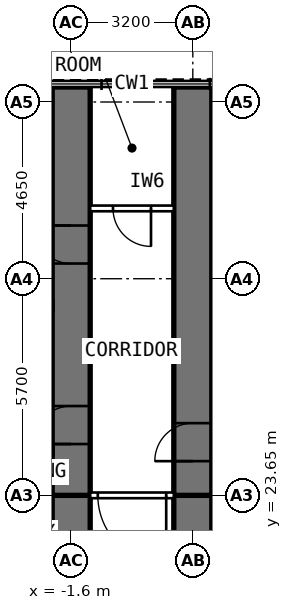
"""IFC4 building model, lengths in metres.
Left out: names, types, materials, properties, quantities, classifications, styles, units other than length and angle.
Written with IfcOpenShell. Run it as: python <this file> out.ifc"""

import sys

from ifc_helpers import new_model, si_unit, direction, frame, frame_2d, origin, place, context, subcontext, project, spatial, rectangle, extrude, element, fill, save


model = new_model("IFC4")
c1 = context("Model", 3, precision=1e-05, world=origin(), true_north=direction((0.0, 1.0)))
c2 = subcontext(c1, "Body", "Model", "MODEL_VIEW")
j1 = project(units=[si_unit("LENGTHUNIT", "METRE"), si_unit("PLANEANGLEUNIT", "RADIAN")], contexts=[c1])
p1 = place(None, origin())
s1 = spatial("IfcSite", under=j1, at=p1, CompositionType="ELEMENT")
p2 = place(p1, origin())
s2 = spatial("IfcBuilding", under=s1, at=p2, CompositionType="ELEMENT")
p3 = place(p2, frame((0.0, 0.0, 43.0)))
s3 = spatial("IfcBuildingStorey", under=s2, at=p3, CompositionType="ELEMENT", Elevation=43.0)
p4 = place(p3, frame((-1.6, 17.95, 0.0), z_axis=(0.0, 0.0, 1.0), x_axis=(0.0, 1.0, 0.0)))
e1 = element("IfcWall", 1, at=p4, inside=s3, PredefinedType="SHEAR", context=c2, shape_type="SweptSolid", body=[
    extrude(rectangle(XDim=5.7, YDim=1.0, at=frame_2d((2.85, 0.0))), origin(), (0.0, 0.0, 1.0), 3.6),
])
p5 = place(p3, frame((-1.6, 23.65, 0.0), z_axis=(0.0, 0.0, 1.0), x_axis=(0.0, 1.0, 0.0)))
e2 = element("IfcWall", 2, at=p5, inside=s3, PredefinedType="SHEAR", context=c2, shape_type="SweptSolid", body=[
    extrude(rectangle(XDim=10.745, YDim=1.0, at=frame_2d((5.373, 0.0))), origin(), (0.0, 0.0, 1.0), 3.6),
])
p6 = place(p5, frame((6.1, 0.0, 0.0)))
e3 = element("IfcOpeningElement", 3, at=p6, cuts=e2, PredefinedType="OPENING", context=c2, shape_type="SweptSolid", body=[
    extrude(rectangle(XDim=1.0, YDim=2.1, at=frame_2d((0.5, 1.05))), frame((0.0, 0.512, 0.0), z_axis=(0.0, -1.0, 0.0), x_axis=(1.0, 0.0, 0.0)), (0.0, 0.0, 1.0), 1.024),
])
p7 = place(p5, frame((1.35, 0.0, 0.0)))
e4 = element("IfcOpeningElement", 4, at=p7, cuts=e2, PredefinedType="OPENING", context=c2, shape_type="SweptSolid", body=[
    extrude(rectangle(XDim=1.0, YDim=2.1, at=frame_2d((0.5, 1.05))), frame((0.0, 0.512, 0.0), z_axis=(0.0, -1.0, 0.0), x_axis=(1.0, 0.0, 0.0)), (0.0, 0.0, 1.0), 1.024),
])
p8 = place(p3, frame((1.6, 17.95, 0.0), z_axis=(0.0, 0.0, 1.0), x_axis=(0.0, 1.0, 0.0)))
e5 = element("IfcWall", 5, at=p8, inside=s3, PredefinedType="SHEAR", context=c2, shape_type="SweptSolid", body=[
    extrude(rectangle(XDim=5.7, YDim=1.0, at=frame_2d((2.85, 0.0))), origin(), (0.0, 0.0, 1.0), 3.6),
])
p9 = place(p3, frame((1.6, 23.65, 0.0), z_axis=(0.0, 0.0, 1.0), x_axis=(0.0, 1.0, 0.0)))
e6 = element("IfcWall", 6, at=p9, inside=s3, PredefinedType="SHEAR", context=c2, shape_type="SweptSolid", body=[
    extrude(rectangle(XDim=10.745, YDim=1.0, at=frame_2d((5.373, 0.0))), origin(), (0.0, 0.0, 1.0), 3.6),
])
p10 = place(p9, frame((0.9, 0.0, 0.0)))
e7 = element("IfcOpeningElement", 7, at=p10, cuts=e6, PredefinedType="OPENING", context=c2, shape_type="SweptSolid", body=[
    extrude(rectangle(XDim=1.0, YDim=2.1, at=frame_2d((0.5, 1.05))), frame((0.0, 0.512, 0.0), z_axis=(0.0, -1.0, 0.0), x_axis=(1.0, 0.0, 0.0)), (0.0, 0.0, 1.0), 1.024),
])
p11 = place(p3, frame((-2.1, 31.45, 0.0), z_axis=(0.0, 0.0, 1.0), x_axis=(-1.0, 0.0, 0.0)))
e8 = element("IfcWall", 8, at=p11, inside=s3, PredefinedType="PARTITIONING", context=c2, shape_type="SweptSolid", body=[
    extrude(rectangle(XDim=3.39, YDim=0.12, at=frame_2d((1.695, 0.0))), origin(), (0.0, 0.0, 1.0), 3.35),
])
p12 = place(p11, frame((1.295, 0.0, 0.0)))
e9 = element("IfcOpeningElement", 9, at=p12, cuts=e8, PredefinedType="OPENING", context=c2, shape_type="SweptSolid", body=[
    extrude(rectangle(XDim=0.8, YDim=2.1, at=frame_2d((0.4, 1.05))), frame((0.0, 0.072, 0.0), z_axis=(0.0, -1.0, 0.0), x_axis=(1.0, 0.0, 0.0)), (0.0, 0.0, 1.0), 0.144),
])
p13 = place(p3, frame((1.1, 31.2, 0.0), z_axis=(0.0, 0.0, 1.0), x_axis=(-1.0, 0.0, 0.0)))
e10 = element("IfcWall", 10, at=p13, inside=s3, PredefinedType="PARTITIONING", context=c2, shape_type="SweptSolid", body=[
    extrude(rectangle(XDim=2.2, YDim=0.15, at=frame_2d((1.1, 0.0))), origin(), (0.0, 0.0, 1.0), 3.35),
])
p14 = place(p13, frame((0.6, 0.0, 0.0)))
e11 = element("IfcOpeningElement", 11, at=p14, cuts=e10, PredefinedType="OPENING", context=c2, shape_type="SweptSolid", body=[
    extrude(rectangle(XDim=1.0, YDim=2.1, at=frame_2d((0.5, 1.05))), frame((0.0, 0.087, 0.0), z_axis=(0.0, -1.0, 0.0), x_axis=(1.0, 0.0, 0.0)), (0.0, 0.0, 1.0), 0.174),
])
p15 = place(p3, frame((1.1, 23.65, 0.0), z_axis=(0.0, 0.0, 1.0), x_axis=(-1.0, 0.0, 0.0)))
e12 = element("IfcWall", 12, at=p15, inside=s3, PredefinedType="PARTITIONING", context=c2, shape_type="SweptSolid", body=[
    extrude(rectangle(XDim=2.2, YDim=0.15, at=frame_2d((1.1, 0.0))), origin(), (0.0, 0.0, 1.0), 3.35),
])
p16 = place(p15, frame((0.2, 0.0, 0.0)))
e13 = element("IfcOpeningElement", 13, at=p16, cuts=e12, PredefinedType="OPENING", context=c2, shape_type="SweptSolid", body=[
    extrude(rectangle(XDim=1.8, YDim=2.1, at=frame_2d((0.9, 1.05))), frame((0.0, 0.087, 0.0), z_axis=(0.0, -1.0, 0.0), x_axis=(1.0, 0.0, 0.0)), (0.0, 0.0, 1.0), 0.174),
])
p17 = place(p6, origin())
e14 = element("IfcDoor", 14, at=p17, inside=s3, OperationType="SINGLE_SWING_RIGHT", PredefinedType="DOOR", context=c2, shape_type="SweptSolid", body=[
    extrude(rectangle(XDim=1.0, YDim=2.1, at=frame_2d((0.5, 1.05))), frame((0.0, 0.25, 0.0), z_axis=(0.0, -1.0, 0.0), x_axis=(1.0, 0.0, 0.0)), (0.0, 0.0, 1.0), 0.5),
])
fill(e3, e14)
p18 = place(p10, origin())
e15 = element("IfcDoor", 15, at=p18, inside=s3, OperationType="SINGLE_SWING_LEFT", PredefinedType="DOOR", context=c2, shape_type="SweptSolid", body=[
    extrude(rectangle(XDim=1.0, YDim=2.1, at=frame_2d((0.5, 1.05))), frame((0.0, 0.25, 0.0), z_axis=(0.0, -1.0, 0.0), x_axis=(1.0, 0.0, 0.0)), (0.0, 0.0, 1.0), 0.5),
])
fill(e7, e15)
p19 = place(p14, origin())
e16 = element("IfcDoor", 16, at=p19, inside=s3, OperationType="SINGLE_SWING_LEFT", PredefinedType="DOOR", context=c2, shape_type="SweptSolid", body=[
    extrude(rectangle(XDim=1.0, YDim=2.1, at=frame_2d((0.5, 1.05))), frame((0.0, 0.025, 0.0), z_axis=(0.0, -1.0, 0.0), x_axis=(1.0, 0.0, 0.0)), (0.0, 0.0, 1.0), 0.05),
])
fill(e11, e16)
p20 = place(p16, origin())
e17 = element("IfcDoor", 17, at=p20, inside=s3, OperationType="DOUBLE_DOOR_DOUBLE_SWING", PredefinedType="DOOR", context=c2, shape_type="SweptSolid", body=[
    extrude(rectangle(XDim=1.8, YDim=2.1, at=frame_2d((0.9, 1.05))), frame((0.0, 0.025, 0.0), z_axis=(0.0, -1.0, 0.0), x_axis=(1.0, 0.0, 0.0)), (0.0, 0.0, 1.0), 0.05),
])
fill(e13, e17)
p21 = place(p7, origin())
e18 = element("IfcDoor", 18, at=p21, inside=s3, OperationType="SINGLE_SWING_LEFT", PredefinedType="DOOR", context=c2, shape_type="SweptSolid", body=[
    extrude(rectangle(XDim=1.0, YDim=2.1, at=frame_2d((0.5, 1.05))), frame((0.0, 0.25, 0.0), z_axis=(0.0, -1.0, 0.0), x_axis=(1.0, 0.0, 0.0)), (0.0, 0.0, 1.0), 0.5),
])
fill(e4, e18)
save(model, sys.argv[1])
